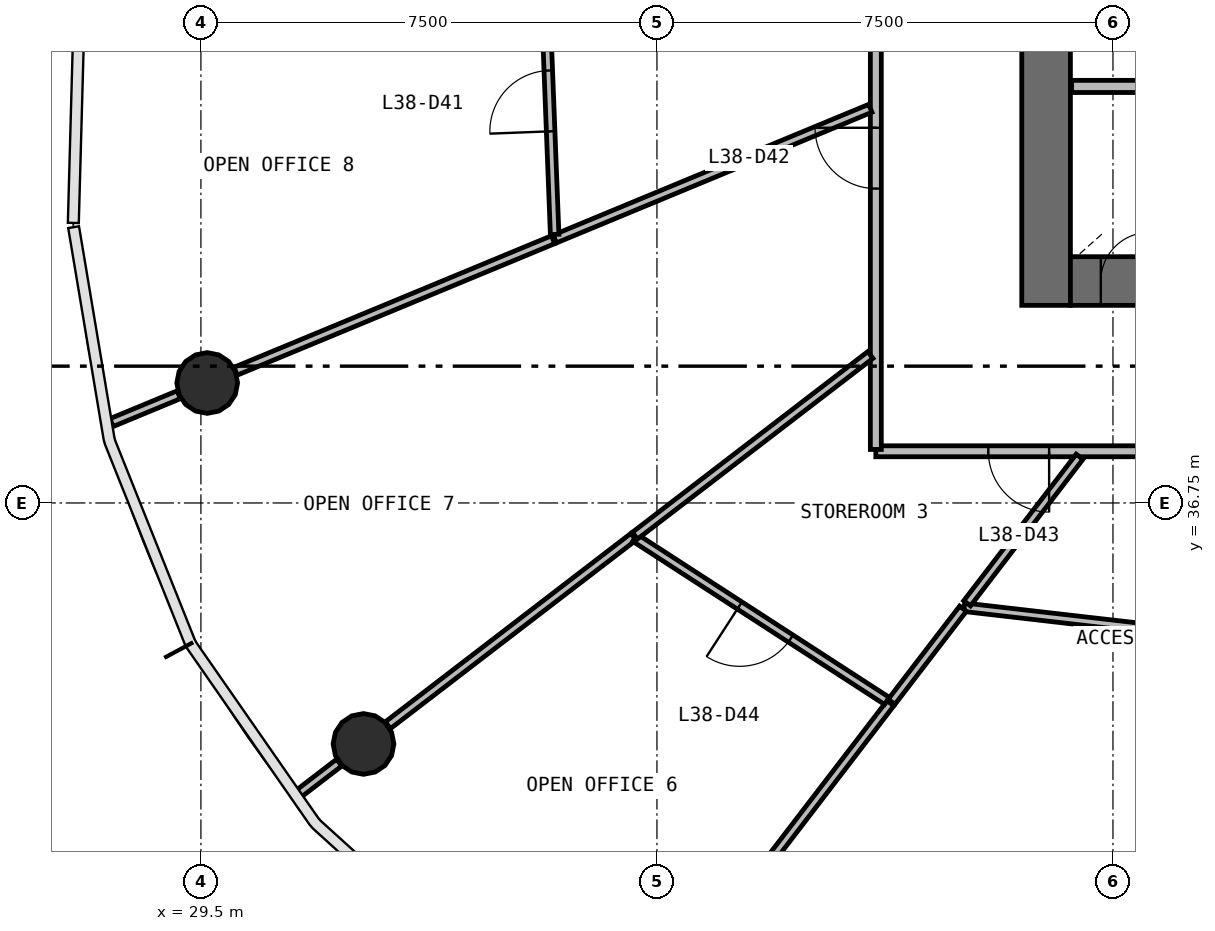
"""IFC4 building model, lengths in metres.
Left out: names, types, materials, properties, quantities, classifications, styles, units other than length and angle.
Written with IfcOpenShell. Run it as: python <this file> out.ifc"""

import sys

from ifc_helpers import new_model, si_unit, direction, frame, frame_2d, origin, origin_2d, place, context, subcontext, project, spatial, rectangle, circle, extrude, source, transform, mapped, element, fill, save


model = new_model("IFC4")
c1 = context("Model", 3, precision=1e-05, world=origin(), true_north=direction((0.0, 1.0)))
c2 = subcontext(c1, "Body", "Model", "MODEL_VIEW")
j1 = project(units=[si_unit("LENGTHUNIT", "METRE"), si_unit("PLANEANGLEUNIT", "RADIAN")], contexts=[c1])
p1 = place(None, origin())
s1 = spatial("IfcSite", under=j1, at=p1, CompositionType="ELEMENT")
p2 = place(p1, origin())
s2 = spatial("IfcBuilding", under=s1, at=p2, CompositionType="ELEMENT")
p3 = place(p2, frame((0.0, 0.0, 160.4)))
s3 = spatial("IfcBuildingStorey", under=s2, at=p3, CompositionType="ELEMENT", Elevation=160.4)
p4 = place(p3, frame((43.4, 56.0, 0.0), z_axis=(0.0, 0.0, 1.0), x_axis=(0.0, -1.0, 0.0)))
e1 = element("IfcWall", 1, at=p4, inside=s3, PredefinedType="SHEAR", context=c2, shape_type="SweptSolid", body=[
    extrude(rectangle(XDim=16.0, YDim=0.8, at=frame_2d((8.0, 0.0))), origin(), (0.0, 0.0, 1.0), 3.9),
])
p5 = place(p4, frame((7.1, 0.0, 0.0)))
e2 = element("IfcOpeningElement", 2, at=p5, cuts=e1, PredefinedType="OPENING", context=c2, shape_type="SweptSolid", body=[
    extrude(rectangle(XDim=1.8, YDim=2.1, at=frame_2d((0.9, 1.05))), frame((0.0, 0.41, 0.0), z_axis=(0.0, -1.0, 0.0), x_axis=(1.0, 0.0, 0.0)), (0.0, 0.0, 1.0), 0.82),
])
p6 = place(p3, frame((43.8, 40.4, 0.0), z_axis=(0.0, 0.0, 1.0), x_axis=(1.0, 0.0, 0.0)))
e3 = element("IfcWall", 3, at=p6, inside=s3, PredefinedType="SHEAR", context=c2, shape_type="SweptSolid", body=[
    extrude(rectangle(XDim=16.4, YDim=0.8, at=frame_2d((8.2, 0.0))), origin(), (0.0, 0.0, 1.0), 3.9),
])
p7 = place(p6, frame((10.1, 0.0, 0.0)))
e4 = element("IfcOpeningElement", 4, at=p7, cuts=e3, PredefinedType="OPENING", context=c2, shape_type="SweptSolid", body=[
    extrude(rectangle(XDim=1.2, YDim=2.1, at=frame_2d((0.6, 1.05))), frame((0.0, 0.41, 0.0), z_axis=(0.0, -1.0, 0.0), x_axis=(1.0, 0.0, 0.0)), (0.0, 0.0, 1.0), 0.82),
])
p8 = place(p6, frame((7.05, 0.0, 0.0)))
e5 = element("IfcOpeningElement", 5, at=p8, cuts=e3, PredefinedType="OPENING", context=c2, shape_type="SweptSolid", body=[
    extrude(rectangle(XDim=1.1, YDim=2.1, at=frame_2d((0.55, 1.05))), frame((0.0, 0.41, 0.0), z_axis=(0.0, -1.0, 0.0), x_axis=(1.0, 0.0, 0.0)), (0.0, 0.0, 1.0), 0.82),
])
p9 = place(p6, frame((0.5, 0.0, 0.0)))
e6 = element("IfcOpeningElement", 6, at=p9, cuts=e3, PredefinedType="OPENING", context=c2, shape_type="SweptSolid", body=[
    extrude(rectangle(XDim=0.8, YDim=2.1, at=frame_2d((0.4, 1.05))), frame((0.0, 0.41, 0.0), z_axis=(0.0, -1.0, 0.0), x_axis=(1.0, 0.0, 0.0)), (0.0, 0.0, 1.0), 0.82),
])
m1 = source(origin(), c2, "Body", "SweptSolid", [
    extrude(circle(Radius=0.5, at=origin_2d()), origin(), (0.0, 0.0, 1.0), 3.9),
])
for number, where, z_axis, x_axis in (
    (7, (29.603, 38.723, 0.0), (0.0, 0.0, 1.0), (1.0, 0.0, 0.0)),
    (8, (32.174, 32.787, 0.0), (0.0, 0.0, 1.0), (1.0, 0.0, 0.0)),
):
    element("IfcColumn", number, at=place(p3, frame(where, z_axis=z_axis, x_axis=x_axis)), inside=s3, PredefinedType="COLUMN", context=c2, shape_type="MappedRepresentation", body=[
        mapped(m1, transform((0.0, 0.0, 0.0), scale=1.0)),
    ])
p10 = place(p3, frame((45.47, 43.6, 0.0), z_axis=(0.0, 0.0, 1.0), x_axis=(-1.0, 0.0, 0.0)))
e9 = element("IfcWall", 9, at=p10, inside=s3, PredefinedType="SOLIDWALL", context=c2, shape_type="SweptSolid", body=[
    extrude(rectangle(XDim=1.65, YDim=0.2, at=frame_2d((0.825, 0.0))), origin(), (0.0, 0.0, 1.0), 3.58),
])
p11 = place(p3, frame((63.4, 37.6, 0.0), z_axis=(0.0, 0.0, 1.0), x_axis=(-1.0, 0.0, 0.0)))
e10 = element("IfcWall", 10, at=p11, inside=s3, PredefinedType="PARTITIONING", context=c2, shape_type="SweptSolid", body=[
    extrude(rectangle(XDim=22.8, YDim=0.18, at=frame_2d((11.4, 0.0))), origin(), (0.0, 0.0, 1.0), 2.88),
])
p12 = place(p11, frame((16.05, 0.0, 0.0)))
e11 = element("IfcOpeningElement", 11, at=p12, cuts=e10, PredefinedType="OPENING", context=c2, shape_type="SweptSolid", body=[
    extrude(rectangle(XDim=0.9, YDim=2.1, at=frame_2d((0.45, 1.05))), frame((0.0, 0.1, 0.0), z_axis=(0.0, -1.0, 0.0), x_axis=(1.0, 0.0, 0.0)), (0.0, 0.0, 1.0), 0.2),
])
p13 = place(p11, frame((13.05, 0.0, 0.0)))
e12 = element("IfcOpeningElement", 12, at=p13, cuts=e10, PredefinedType="OPENING", context=c2, shape_type="SweptSolid", body=[
    extrude(rectangle(XDim=0.9, YDim=2.1, at=frame_2d((0.45, 1.05))), frame((0.0, 0.1, 0.0), z_axis=(0.0, -1.0, 0.0), x_axis=(1.0, 0.0, 0.0)), (0.0, 0.0, 1.0), 0.2),
])
p14 = place(p11, frame((10.95, 0.0, 0.0)))
e13 = element("IfcOpeningElement", 13, at=p14, cuts=e10, PredefinedType="OPENING", context=c2, shape_type="SweptSolid", body=[
    extrude(rectangle(XDim=1.0, YDim=2.1, at=frame_2d((0.5, 1.05))), frame((0.0, 0.1, 0.0), z_axis=(0.0, -1.0, 0.0), x_axis=(1.0, 0.0, 0.0)), (0.0, 0.0, 1.0), 0.2),
])
p15 = place(p11, frame((19.95, 0.0, 0.0)))
e14 = element("IfcOpeningElement", 14, at=p15, cuts=e10, PredefinedType="OPENING", context=c2, shape_type="SweptSolid", body=[
    extrude(rectangle(XDim=1.0, YDim=2.1, at=frame_2d((0.5, 1.05))), frame((0.0, 0.1, 0.0), z_axis=(0.0, -1.0, 0.0), x_axis=(1.0, 0.0, 0.0)), (0.0, 0.0, 1.0), 0.2),
])
p16 = place(p3, frame((40.6, 37.63, 0.0), z_axis=(0.0, 0.0, 1.0), x_axis=(0.0, 1.0, 0.0)))
e15 = element("IfcWall", 15, at=p16, inside=s3, PredefinedType="PARTITIONING", context=c2, shape_type="SweptSolid", body=[
    extrude(rectangle(XDim=20.74, YDim=0.18, at=frame_2d((10.37, 0.0))), origin(), (0.0, 0.0, 1.0), 2.88),
])
p17 = place(p16, frame((9.89, 0.0, 0.0)))
e16 = element("IfcOpeningElement", 16, at=p17, cuts=e15, PredefinedType="OPENING", context=c2, shape_type="SweptSolid", body=[
    extrude(rectangle(XDim=1.0, YDim=2.1, at=frame_2d((0.5, 1.05))), frame((0.0, 0.1, 0.0), z_axis=(0.0, -1.0, 0.0), x_axis=(1.0, 0.0, 0.0)), (0.0, 0.0, 1.0), 0.2),
])
p18 = place(p16, frame((4.29, 0.0, 0.0)))
e17 = element("IfcOpeningElement", 17, at=p18, cuts=e15, PredefinedType="OPENING", context=c2, shape_type="SweptSolid", body=[
    extrude(rectangle(XDim=1.0, YDim=2.1, at=frame_2d((0.5, 1.05))), frame((0.0, 0.1, 0.0), z_axis=(0.0, -1.0, 0.0), x_axis=(1.0, 0.0, 0.0)), (0.0, 0.0, 1.0), 0.2),
])
p19 = place(p3, frame((40.51, 43.241, 0.0), z_axis=(0.0, 0.0, 1.0), x_axis=(-0.92387220975, -0.382701110597, 0.0)))
e18 = element("IfcWall", 18, at=p19, inside=s3, PredefinedType="PARTITIONING", context=c2, shape_type="SweptSolid", body=[
    extrude(rectangle(XDim=5.617, YDim=0.14, at=frame_2d((2.809, 0.0))), origin(), (0.0, 0.0, 1.0), 2.88),
])
p20 = place(p3, frame((35.293, 41.08, 0.0), z_axis=(0.0, 0.0, 1.0), x_axis=(-0.923883666289, -0.38267345239, 0.0)))
e19 = element("IfcWall", 19, at=p20, inside=s3, PredefinedType="PARTITIONING", context=c2, shape_type="SweptSolid", body=[
    extrude(rectangle(XDim=5.653, YDim=0.14, at=frame_2d((2.827, 0.0))), origin(), (0.0, 0.0, 1.0), 2.88),
])
p21 = place(p3, frame((40.841, 33.457, 0.0), z_axis=(0.0, 0.0, 1.0), x_axis=(-0.608780216018, -0.793338924159, 0.0)))
e20 = element("IfcWall", 20, at=p21, inside=s3, PredefinedType="PARTITIONING", context=c2, shape_type="SweptSolid", body=[
    extrude(rectangle(XDim=5.188, YDim=0.14, at=frame_2d((2.594, 0.0))), origin(), (0.0, 0.0, 1.0), 2.88),
])
p22 = place(p3, frame((36.614, 36.194, 0.0), z_axis=(0.0, 0.0, 1.0), x_axis=(-0.79337017358, -0.608739490811, 0.0)))
e21 = element("IfcWall", 21, at=p22, inside=s3, PredefinedType="PARTITIONING", context=c2, shape_type="SweptSolid", body=[
    extrude(rectangle(XDim=5.092, YDim=0.14, at=frame_2d((2.546, 0.0))), origin(), (0.0, 0.0, 1.0), 2.88),
])
p23 = place(p3, frame((40.782, 33.495, 0.0), z_axis=(0.0, 0.0, 1.0), x_axis=(-0.839336490457, 0.543612229247, 0.0)))
e22 = element("IfcWall", 22, at=p23, inside=s3, PredefinedType="PARTITIONING", context=c2, shape_type="SweptSolid", body=[
    extrude(rectangle(XDim=4.935, YDim=0.14, at=frame_2d((2.468, 0.0))), origin(), (0.0, 0.0, 1.0), 2.88),
])
p24 = place(p23, frame((1.885, 0.0, 0.0)))
e23 = element("IfcOpeningElement", 23, at=p24, cuts=e22, PredefinedType="OPENING", context=c2, shape_type="SweptSolid", body=[
    extrude(rectangle(XDim=1.0, YDim=2.1, at=frame_2d((0.5, 1.05))), frame((0.0, 0.08, 0.0), z_axis=(0.0, -1.0, 0.0), x_axis=(1.0, 0.0, 0.0)), (0.0, 0.0, 1.0), 0.16),
])
p25 = place(p3, frame((40.51, 39.183, 0.0), z_axis=(0.0, 0.0, 1.0), x_axis=(-0.793354275357, -0.608760210405, 0.0)))
e24 = element("IfcWall", 24, at=p25, inside=s3, PredefinedType="PARTITIONING", context=c2, shape_type="SweptSolid", body=[
    extrude(rectangle(XDim=4.88, YDim=0.14, at=frame_2d((2.44, 0.0))), origin(), (0.0, 0.0, 1.0), 2.88),
])
p26 = place(p3, frame((35.318, 41.166, 0.0), z_axis=(0.0, 0.0, 1.0), x_axis=(-0.038760942668, 0.999248512295, 0.0)))
e25 = element("IfcWall", 25, at=p26, inside=s3, PredefinedType="PARTITIONING", context=c2, shape_type="SweptSolid", body=[
    extrude(rectangle(XDim=4.548, YDim=0.14, at=frame_2d((2.274, 0.0))), origin(), (0.0, 0.0, 1.0), 2.88),
])
p27 = place(p26, frame((1.698, 0.0, 0.0)))
e26 = element("IfcOpeningElement", 26, at=p27, cuts=e25, PredefinedType="OPENING", context=c2, shape_type="SweptSolid", body=[
    extrude(rectangle(XDim=1.0, YDim=2.1, at=frame_2d((0.5, 1.05))), frame((0.0, 0.08, 0.0), z_axis=(0.0, -1.0, 0.0), x_axis=(1.0, 0.0, 0.0)), (0.0, 0.0, 1.0), 0.16),
])
p28 = place(p3, frame((42.052, 35.035, 0.0), z_axis=(0.0, 0.0, 1.0), x_axis=(0.993448498383, -0.114280711669, 0.0)))
e27 = element("IfcWall", 27, at=p28, inside=s3, PredefinedType="PARTITIONING", context=c2, shape_type="SweptSolid", body=[
    extrude(rectangle(XDim=4.399, YDim=0.14, at=frame_2d((2.199, 0.0))), origin(), (0.0, 0.0, 1.0), 2.88),
])
p29 = place(p3, frame((43.951, 37.51, 0.0), z_axis=(0.0, 0.0, 1.0), x_axis=(-0.608758797461, -0.793355359542, 0.0)))
e28 = element("IfcWall", 28, at=p29, inside=s3, PredefinedType="PARTITIONING", context=c2, shape_type="SweptSolid", body=[
    extrude(rectangle(XDim=3.038, YDim=0.14, at=frame_2d((1.519, 0.0))), origin(), (0.0, 0.0, 1.0), 2.88),
])
p30 = place(p3, frame((42.033, 35.011, 0.0), z_axis=(0.0, 0.0, 1.0), x_axis=(-0.608750262105, -0.793361908833, 0.0)))
e29 = element("IfcWall", 29, at=p30, inside=s3, PredefinedType="PARTITIONING", context=c2, shape_type="SweptSolid", body=[
    extrude(rectangle(XDim=1.929, YDim=0.14, at=frame_2d((0.965, 0.0))), origin(), (0.0, 0.0, 1.0), 2.88),
])
p31 = place(p3, frame((29.137, 38.53, 0.0), z_axis=(0.0, 0.0, 1.0), x_axis=(-0.923882723383, -0.382675728829, 0.0)))
e30 = element("IfcWall", 30, at=p31, inside=s3, PredefinedType="PARTITIONING", context=c2, shape_type="SweptSolid", body=[
    extrude(rectangle(XDim=1.198, YDim=0.14, at=frame_2d((0.599, 0.0))), origin(), (0.0, 0.0, 1.0), 2.88),
])
p32 = place(p3, frame((31.774, 32.48, 0.0), z_axis=(0.0, 0.0, 1.0), x_axis=(-0.793296212725, -0.608835871871, 0.0)))
e31 = element("IfcWall", 31, at=p32, inside=s3, PredefinedType="PARTITIONING", context=c2, shape_type="SweptSolid", body=[
    extrude(rectangle(XDim=0.836, YDim=0.14, at=frame_2d((0.418, 0.0))), origin(), (0.0, 0.0, 1.0), 2.88),
])
m2 = source(origin(), c2, "Body", "SweptSolid", [
    extrude(rectangle(XDim=0.8, YDim=2.1, at=frame_2d((0.4, 1.05))), frame((0.0, 0.025, 0.0), z_axis=(0.0, -1.0, 0.0), x_axis=(1.0, 0.0, 0.0)), (0.0, 0.0, 1.0), 0.05),
])
p33 = place(p9, origin())
e32 = element("IfcDoor", 32, at=p33, inside=s3, OperationType="SINGLE_SWING_RIGHT", PredefinedType="DOOR", context=c2, shape_type="MappedRepresentation", body=[
    mapped(m2, transform((0.0, 0.0, 0.0), scale=1.0)),
])
fill(e6, e32)
m3 = source(origin(), c2, "Body", "SweptSolid", [
    extrude(rectangle(XDim=1.0, YDim=2.1, at=frame_2d((0.5, 1.05))), frame((0.0, 0.025, 0.0), z_axis=(0.0, -1.0, 0.0), x_axis=(1.0, 0.0, 0.0)), (0.0, 0.0, 1.0), 0.05),
])
p34 = place(p27, origin())
e33 = element("IfcDoor", 33, at=p34, inside=s3, OperationType="SINGLE_SWING_LEFT", PredefinedType="DOOR", context=c2, shape_type="MappedRepresentation", body=[
    mapped(m3, transform((0.0, 0.0, 0.0), scale=1.0)),
])
fill(e26, e33)
p35 = place(p18, origin())
e34 = element("IfcDoor", 34, at=p35, inside=s3, OperationType="SINGLE_SWING_RIGHT", PredefinedType="DOOR", context=c2, shape_type="MappedRepresentation", body=[
    mapped(m3, transform((0.0, 0.0, 0.0), scale=1.0)),
])
fill(e17, e34)
p36 = place(p15, origin())
e35 = element("IfcDoor", 35, at=p36, inside=s3, OperationType="SINGLE_SWING_LEFT", PredefinedType="DOOR", context=c2, shape_type="MappedRepresentation", body=[
    mapped(m3, transform((0.0, 0.0, 0.0), scale=1.0)),
])
fill(e14, e35)
p37 = place(p24, origin())
e36 = element("IfcDoor", 36, at=p37, inside=s3, OperationType="SINGLE_SWING_RIGHT", PredefinedType="DOOR", context=c2, shape_type="MappedRepresentation", body=[
    mapped(m3, transform((0.0, 0.0, 0.0), scale=1.0)),
])
fill(e23, e36)
save(model, sys.argv[1])
